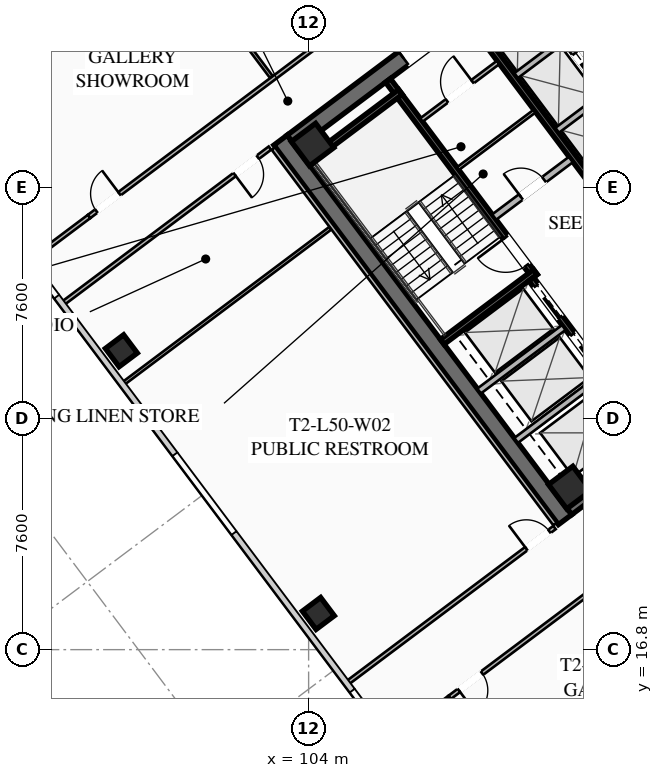
"""IFC4 building model, lengths in metres.
Left out: names, types, materials, properties, quantities, classifications, styles, units other than length and angle.
Written with IfcOpenShell. Run it as: python <this file> out.ifc"""

import sys

from ifc_helpers import new_model, si_unit, direction, frame, frame_2d, origin, origin_2d, place, context, subcontext, project, spatial, rectangle, hollow_rectangle, extrude, element, fill, save


model = new_model("IFC4")
c1 = context("Model", 3, precision=1e-05, world=origin(), true_north=direction((0.0, 1.0)))
c2 = subcontext(c1, "Body", "Model", "MODEL_VIEW")
j1 = project(units=[si_unit("LENGTHUNIT", "METRE"), si_unit("PLANEANGLEUNIT", "RADIAN")], contexts=[c1])
p1 = place(None, origin())
s1 = spatial("IfcSite", under=j1, at=p1, CompositionType="ELEMENT")
p2 = place(p1, origin())
s2 = spatial("IfcBuilding", under=s1, at=p2, CompositionType="ELEMENT")
p3 = place(p2, frame((0.0, 0.0, 185.4)))
s3 = spatial("IfcBuildingStorey", under=s2, at=p3, CompositionType="ELEMENT", Elevation=185.4)
p4 = place(p3, frame((112.436, 21.077, 0.0), z_axis=(0.0, 0.0, 1.0), x_axis=(-0.600005007985, 0.799996243986, 0.0)))
e1 = element("IfcWall", 1, at=p4, inside=s3, PredefinedType="SHEAR", context=c2, shape_type="SweptSolid", body=[
    extrude(rectangle(XDim=15.6, YDim=0.55, at=frame_2d((7.8, 0.0))), origin(), (0.0, 0.0, 1.0), 3.55),
])
p5 = place(p3, frame((124.539, 30.498, 0.0), z_axis=(0.0, 0.0, 1.0), x_axis=(-0.799998054672, -0.600002593761, 0.0)))
e2 = element("IfcWall", 2, at=p5, inside=s3, PredefinedType="SHEAR", context=c2, shape_type="SweptSolid", body=[
    extrude(rectangle(XDim=15.06, YDim=0.55, at=frame_2d((7.53, 0.0))), origin(), (0.0, 0.0, 1.0), 3.55),
])
p6 = place(p5, frame((9.23, 0.0, 0.0)))
e3 = element("IfcOpeningElement", 3, at=p6, cuts=e2, PredefinedType="OPENING", context=c2, shape_type="SweptSolid", body=[
    extrude(rectangle(XDim=1.25, YDim=2.25, at=frame_2d((0.625, 1.125))), frame((0.0, 0.285, 0.0), z_axis=(0.0, -1.0, 0.0), x_axis=(1.0, 0.0, 0.0)), (0.0, 0.0, 1.0), 0.57),
])
p7 = place(p5, frame((4.18, 0.0, 0.0)))
e4 = element("IfcOpeningElement", 4, at=p7, cuts=e2, PredefinedType="OPENING", context=c2, shape_type="SweptSolid", body=[
    extrude(rectangle(XDim=1.25, YDim=2.25, at=frame_2d((0.625, 1.125))), frame((0.0, 0.285, 0.0), z_axis=(0.0, -1.0, 0.0), x_axis=(1.0, 0.0, 0.0)), (0.0, 0.0, 1.0), 0.57),
])
p8 = place(p3, frame((103.461, 33.502, 0.0), z_axis=(0.0, 0.0, 1.0), x_axis=(0.799998054672, 0.600002593761, 0.0)))
e5 = element("IfcWall", 5, at=p8, inside=s3, PredefinedType="SHEAR", context=c2, shape_type="SweptSolid", body=[
    extrude(rectangle(XDim=15.06, YDim=0.55, at=frame_2d((7.53, 0.0))), origin(), (0.0, 0.0, 1.0), 3.55),
])
p9 = place(p8, frame((4.58, 0.0, 0.0)))
e6 = element("IfcOpeningElement", 6, at=p9, cuts=e5, PredefinedType="OPENING", context=c2, shape_type="SweptSolid", body=[
    extrude(rectangle(XDim=1.25, YDim=2.25, at=frame_2d((0.625, 1.125))), frame((0.0, 0.285, 0.0), z_axis=(0.0, -1.0, 0.0), x_axis=(1.0, 0.0, 0.0)), (0.0, 0.0, 1.0), 0.57),
])
p10 = place(p8, frame((9.63, 0.0, 0.0)))
e7 = element("IfcOpeningElement", 7, at=p10, cuts=e5, PredefinedType="OPENING", context=c2, shape_type="SweptSolid", body=[
    extrude(rectangle(XDim=1.25, YDim=2.25, at=frame_2d((0.625, 1.125))), frame((0.0, 0.285, 0.0), z_axis=(0.0, -1.0, 0.0), x_axis=(1.0, 0.0, 0.0)), (0.0, 0.0, 1.0), 0.57),
])
for number, where, z_axis, x_axis in (
    (8, (112.59, 22.13, 0.0), (0.0, 0.0, 1.0), (0.8, 0.6, 0.0)),
    (9, (104.13, 33.41, 0.0), (0.0, 0.0, 1.0), (0.8, 0.6, 0.0)),
):
    element("IfcColumn", number, at=place(p3, frame(where, z_axis=z_axis, x_axis=x_axis)), inside=s3, PredefinedType="COLUMN", context=c2, shape_type="SweptSolid", body=[
        extrude(hollow_rectangle(XDim=1.0, YDim=1.0, WallThickness=0.04, at=origin_2d()), origin(), (0.0, 0.0, 1.0), 3.37),
    ])
for number, where, z_axis, x_axis in (
    (10, (97.84, 26.63, 0.0), (0.0, 0.0, 1.0), (0.8, 0.6, 0.0)),
    (11, (104.32, 17.99, 0.0), (0.0, 0.0, 1.0), (0.8, 0.6, 0.0)),
):
    element("IfcColumn", number, at=place(p3, frame(where, z_axis=z_axis, x_axis=x_axis)), inside=s3, PredefinedType="COLUMN", context=c2, shape_type="SweptSolid", body=[
        extrude(hollow_rectangle(XDim=0.75, YDim=0.75, WallThickness=0.032, at=origin_2d()), origin(), (0.0, 0.0, 1.0), 3.37),
    ])
p11 = place(p3, frame((111.44, 29.08, 0.0), z_axis=(0.0, 0.0, 1.0), x_axis=(-0.59999029481, 0.8000072788, 0.0)))
e12 = element("IfcWall", 12, at=p11, inside=s3, PredefinedType="SHEAR", context=c2, shape_type="SweptSolid", body=[
    extrude(rectangle(XDim=8.05, YDim=0.2, at=frame_2d((4.025, 0.0))), origin(), (0.0, 0.0, 1.0), 3.37),
])
p12 = place(p11, frame((0.45, 0.0, 0.0)))
e13 = element("IfcOpeningElement", 13, at=p12, cuts=e12, PredefinedType="OPENING", context=c2, shape_type="SweptSolid", body=[
    extrude(rectangle(XDim=1.15, YDim=2.2, at=frame_2d((0.575, 1.1))), frame((0.0, 0.11, 0.0), z_axis=(0.0, -1.0, 0.0), x_axis=(1.0, 0.0, 0.0)), (0.0, 0.0, 1.0), 0.22),
])
for number, where, z_axis, x_axis in (
    (14, (108.396, 26.922, 0.0), (0.0, 0.0, 1.0), (0.8, 0.6, 0.0)),
    (15, (103.956, 32.842, 0.0), (0.0, 0.0, 1.0), (0.8, 0.6, 0.0)),
):
    element("IfcWall", number, at=place(p3, frame(where, z_axis=z_axis, x_axis=x_axis)), inside=s3, PredefinedType="SHEAR", context=c2, shape_type="SweptSolid", body=[
        extrude(rectangle(XDim=3.83, YDim=0.2, at=frame_2d((1.915, 0.0))), origin(), (0.0, 0.0, 1.0), 3.37),
    ])
p13 = place(p3, frame((117.998, 25.936, 0.0), z_axis=(0.0, 0.0, 1.0), x_axis=(-0.600002693989, 0.799997979501, 0.0)))
e16 = element("IfcWall", 16, at=p13, inside=s3, PredefinedType="SHEAR", context=c2, shape_type="SweptSolid", body=[
    extrude(rectangle(XDim=14.5, YDim=0.2, at=frame_2d((7.25, 0.0))), origin(), (0.0, 0.0, 1.0), 3.37),
])
p14 = place(p3, frame((110.104, 31.028, 0.0), z_axis=(0.0, 0.0, 1.0), x_axis=(0.800018601094, 0.59997519774, 0.0)))
e17 = element("IfcWall", 17, at=p14, inside=s3, PredefinedType="SOLIDWALL", context=c2, shape_type="SweptSolid", body=[
    extrude(rectangle(XDim=3.15, YDim=0.22, at=frame_2d((1.575, 0.0))), origin(), (0.0, 0.0, 1.0), 2.723),
])
p15 = place(p14, frame((1.1, 0.0, 0.0)))
e18 = element("IfcOpeningElement", 18, at=p15, cuts=e17, PredefinedType="OPENING", context=c2, shape_type="SweptSolid", body=[
    extrude(rectangle(XDim=0.95, YDim=2.05, at=frame_2d((0.475, 1.025))), frame((0.0, 0.12, 0.0), z_axis=(0.0, -1.0, 0.0), x_axis=(1.0, 0.0, 0.0)), (0.0, 0.0, 1.0), 0.24),
])
p16 = place(p3, frame((115.19, 23.83, 0.0), z_axis=(0.0, 0.0, 1.0), x_axis=(-0.599993943644, 0.800004542231, 0.0)))
e19 = element("IfcWall", 19, at=p16, inside=s3, PredefinedType="SHEAR", context=c2, shape_type="SweptSolid", body=[
    extrude(rectangle(XDim=6.45, YDim=0.2, at=frame_2d((3.225, 0.0))), origin(), (0.0, 0.0, 1.0), 3.37),
])
p17 = place(p16, frame((4.875, 0.0, 0.0)))
e20 = element("IfcOpeningElement", 20, at=p17, cuts=e19, PredefinedType="OPENING", context=c2, shape_type="SweptSolid", body=[
    extrude(rectangle(XDim=1.3, YDim=2.25, at=frame_2d((0.65, 1.125))), frame((0.0, 0.11, 0.0), z_axis=(0.0, -1.0, 0.0), x_axis=(1.0, 0.0, 0.0)), (0.0, 0.0, 1.0), 0.22),
])
p18 = place(p16, frame((2.875, 0.0, 0.0)))
e21 = element("IfcOpeningElement", 21, at=p18, cuts=e19, PredefinedType="OPENING", context=c2, shape_type="SweptSolid", body=[
    extrude(rectangle(XDim=1.3, YDim=2.25, at=frame_2d((0.65, 1.125))), frame((0.0, 0.11, 0.0), z_axis=(0.0, -1.0, 0.0), x_axis=(1.0, 0.0, 0.0)), (0.0, 0.0, 1.0), 0.22),
])
p19 = place(p16, frame((0.675, 0.0, 0.0)))
e22 = element("IfcOpeningElement", 22, at=p19, cuts=e19, PredefinedType="OPENING", context=c2, shape_type="SweptSolid", body=[
    extrude(rectangle(XDim=1.3, YDim=2.25, at=frame_2d((0.65, 1.125))), frame((0.0, 0.11, 0.0), z_axis=(0.0, -1.0, 0.0), x_axis=(1.0, 0.0, 0.0)), (0.0, 0.0, 1.0), 0.22),
])
for number, where, z_axis, x_axis in (
    (23, (110.826, 23.682, 0.0), (0.0, 0.0, 1.0), (0.8, 0.6, 0.0)),
    (24, (109.608, 25.306, 0.0), (0.0, 0.0, 1.0), (0.8, 0.6, 0.0)),
):
    element("IfcWall", number, at=place(p3, frame(where, z_axis=z_axis, x_axis=x_axis)), inside=s3, PredefinedType="SOLIDWALL", context=c2, shape_type="SweptSolid", body=[
        extrude(rectangle(XDim=3.48, YDim=0.2, at=frame_2d((1.74, 0.0))), origin(), (0.0, 0.0, 1.0), 3.37),
    ])
p20 = place(p3, frame((112.81, 40.17, 0.0), z_axis=(0.0, 0.0, 1.0), x_axis=(0.599993943644, -0.800004542231, 0.0)))
e25 = element("IfcWall", 25, at=p20, inside=s3, PredefinedType="SHEAR", context=c2, shape_type="SweptSolid", body=[
    extrude(rectangle(XDim=6.45, YDim=0.2, at=frame_2d((3.225, 0.0))), origin(), (0.0, 0.0, 1.0), 3.37),
])
p21 = place(p3, frame((107.71, 34.22, 0.0), z_axis=(0.0, 0.0, 1.0), x_axis=(0.799981399002, 0.60002480053, 0.0)))
e26 = element("IfcWall", 26, at=p21, inside=s3, PredefinedType="PARTITIONING", context=c2, shape_type="SweptSolid", body=[
    extrude(rectangle(XDim=3.15, YDim=0.135, at=frame_2d((1.575, 0.0))), origin(), (0.0, 0.0, 1.0), 2.723),
])
p22 = place(p21, frame((1.05, 0.0, 0.0)))
e27 = element("IfcOpeningElement", 27, at=p22, cuts=e26, PredefinedType="OPENING", context=c2, shape_type="SweptSolid", body=[
    extrude(rectangle(XDim=1.05, YDim=2.2, at=frame_2d((0.525, 1.1))), frame((0.0, 0.077, 0.0), z_axis=(0.0, -1.0, 0.0), x_axis=(1.0, 0.0, 0.0)), (0.0, 0.0, 1.0), 0.155),
])
p23 = place(p3, frame((108.91, 32.62, 0.0), z_axis=(0.0, 0.0, 1.0), x_axis=(0.800018601094, 0.59997519774, 0.0)))
e28 = element("IfcWall", 28, at=p23, inside=s3, PredefinedType="PARTITIONING", context=c2, shape_type="SweptSolid", body=[
    extrude(rectangle(XDim=3.15, YDim=0.11, at=frame_2d((1.575, 0.0))), origin(), (0.0, 0.0, 1.0), 2.723),
])
p24 = place(p3, frame((115.11, 33.27, 0.0), z_axis=(0.0, 0.0, 1.0), x_axis=(-0.600011322243, 0.799991508192, 0.0)))
e29 = element("IfcWall", 29, at=p24, inside=s3, PredefinedType="SOLIDWALL", context=c2, shape_type="SweptSolid", body=[
    extrude(rectangle(XDim=6.9, YDim=0.2, at=frame_2d((3.45, 0.0))), origin(), (0.0, 0.0, 1.0), 3.37),
])
p25 = place(p24, frame((0.575, 0.0, 0.0)))
e30 = element("IfcOpeningElement", 30, at=p25, cuts=e29, PredefinedType="OPENING", context=c2, shape_type="SweptSolid", body=[
    extrude(rectangle(XDim=1.1, YDim=2.2, at=frame_2d((0.55, 1.1))), frame((0.0, 0.11, 0.0), z_axis=(0.0, -1.0, 0.0), x_axis=(1.0, 0.0, 0.0)), (0.0, 0.0, 1.0), 0.22),
])
p26 = place(p24, frame((2.825, 0.0, 0.0)))
e31 = element("IfcOpeningElement", 31, at=p26, cuts=e29, PredefinedType="OPENING", context=c2, shape_type="SweptSolid", body=[
    extrude(rectangle(XDim=1.1, YDim=2.2, at=frame_2d((0.55, 1.1))), frame((0.0, 0.11, 0.0), z_axis=(0.0, -1.0, 0.0), x_axis=(1.0, 0.0, 0.0)), (0.0, 0.0, 1.0), 0.22),
])
p27 = place(p24, frame((5.075, 0.0, 0.0)))
e32 = element("IfcOpeningElement", 32, at=p27, cuts=e29, PredefinedType="OPENING", context=c2, shape_type="SweptSolid", body=[
    extrude(rectangle(XDim=1.1, YDim=2.2, at=frame_2d((0.55, 1.1))), frame((0.0, 0.11, 0.0), z_axis=(0.0, -1.0, 0.0), x_axis=(1.0, 0.0, 0.0)), (0.0, 0.0, 1.0), 0.22),
])
p28 = place(p3, frame((112.176, 33.882, 0.0), z_axis=(0.0, 0.0, 1.0), x_axis=(0.8, 0.6, 0.0)))
e33 = element("IfcWall", 33, at=p28, inside=s3, PredefinedType="SOLIDWALL", context=c2, shape_type="SweptSolid", body=[
    extrude(rectangle(XDim=1.88, YDim=0.2, at=frame_2d((0.94, 0.0))), origin(), (0.0, 0.0, 1.0), 3.37),
])
p29 = place(p3, frame((110.826, 35.682, 0.0), z_axis=(0.0, 0.0, 1.0), x_axis=(0.799984418148, 0.600020775241, 0.0)))
e34 = element("IfcWall", 34, at=p29, inside=s3, PredefinedType="SOLIDWALL", context=c2, shape_type="SweptSolid", body=[
    extrude(rectangle(XDim=1.88, YDim=0.2, at=frame_2d((0.94, 0.0))), origin(), (0.0, 0.0, 1.0), 3.37),
])
p30 = place(p3, frame((96.778, 31.046, 0.0), z_axis=(0.0, 0.0, 1.0), x_axis=(0.799995916807, 0.600005444218, 0.0)))
e35 = element("IfcWall", 35, at=p30, inside=s3, PredefinedType="PARTITIONING", context=c2, shape_type="SweptSolid", body=[
    extrude(rectangle(XDim=28.7, YDim=0.135, at=frame_2d((14.35, 0.0))), origin(), (0.0, 0.0, 1.0), 2.723),
])
p31 = place(p30, frame((0.3, 0.0, 0.0)))
e36 = element("IfcOpeningElement", 36, at=p31, cuts=e35, PredefinedType="OPENING", context=c2, shape_type="SweptSolid", body=[
    extrude(rectangle(XDim=0.95, YDim=2.05, at=frame_2d((0.475, 1.025))), frame((0.0, 0.077, 0.0), z_axis=(0.0, -1.0, 0.0), x_axis=(1.0, 0.0, 0.0)), (0.0, 0.0, 1.0), 0.155),
])
p32 = place(p30, frame((13.82, 0.0, 0.0)))
e37 = element("IfcOpeningElement", 37, at=p32, cuts=e35, PredefinedType="OPENING", context=c2, shape_type="SweptSolid", body=[
    extrude(rectangle(XDim=0.95, YDim=2.05, at=frame_2d((0.475, 1.025))), frame((0.0, 0.077, 0.0), z_axis=(0.0, -1.0, 0.0), x_axis=(1.0, 0.0, 0.0)), (0.0, 0.0, 1.0), 0.155),
])
p33 = place(p30, frame((17.821, 0.0, 0.0)))
e38 = element("IfcOpeningElement", 38, at=p33, cuts=e35, PredefinedType="OPENING", context=c2, shape_type="SweptSolid", body=[
    extrude(rectangle(XDim=0.95, YDim=2.05, at=frame_2d((0.475, 1.025))), frame((0.0, 0.077, 0.0), z_axis=(0.0, -1.0, 0.0), x_axis=(1.0, 0.0, 0.0)), (0.0, 0.0, 1.0), 0.155),
])
p34 = place(p30, frame((27.45, 0.0, 0.0)))
e39 = element("IfcOpeningElement", 39, at=p34, cuts=e35, PredefinedType="OPENING", context=c2, shape_type="SweptSolid", body=[
    extrude(rectangle(XDim=0.95, YDim=2.05, at=frame_2d((0.475, 1.025))), frame((0.0, 0.077, 0.0), z_axis=(0.0, -1.0, 0.0), x_axis=(1.0, 0.0, 0.0)), (0.0, 0.0, 1.0), 0.155),
])
p35 = place(p3, frame((94.834, 29.588, 0.0), z_axis=(0.0, 0.0, 1.0), x_axis=(0.800012055778, 0.599983925293, 0.0)))
e40 = element("IfcWall", 40, at=p35, inside=s3, PredefinedType="PARTITIONING", context=c2, shape_type="SweptSolid", body=[
    extrude(rectangle(XDim=2.43, YDim=0.135, at=frame_2d((1.215, 0.0))), origin(), (0.0, 0.0, 1.0), 2.723),
])
p36 = place(p3, frame((102.77, 35.64, 0.0), z_axis=(0.0, 0.0, 1.0), x_axis=(-0.6, 0.8, 0.0)))
e41 = element("IfcWall", 41, at=p36, inside=s3, PredefinedType="PARTITIONING", context=c2, shape_type="SweptSolid", body=[
    extrude(rectangle(XDim=7.13, YDim=0.11, at=frame_2d((3.565, 0.0))), origin(), (0.0, 0.0, 1.0), 2.723),
])
p37 = place(p3, frame((131.6, 32.45, 0.0), z_axis=(0.0, 0.0, 1.0), x_axis=(-0.800003062365, -0.599995916825, 0.0)))
e42 = element("IfcWall", 42, at=p37, inside=s3, PredefinedType="PARTITIONING", context=c2, shape_type="SweptSolid", body=[
    extrude(rectangle(XDim=28.7, YDim=0.135, at=frame_2d((14.35, 0.0))), origin(), (0.0, 0.0, 1.0), 2.723),
])
p38 = place(p37, frame((27.37, 0.0, 0.0)))
e43 = element("IfcOpeningElement", 43, at=p38, cuts=e42, PredefinedType="OPENING", context=c2, shape_type="SweptSolid", body=[
    extrude(rectangle(XDim=0.95, YDim=2.05, at=frame_2d((0.475, 1.025))), frame((0.0, 0.077, 0.0), z_axis=(0.0, -1.0, 0.0), x_axis=(1.0, 0.0, 0.0)), (0.0, 0.0, 1.0), 0.155),
])
p39 = place(p37, frame((13.59, 0.0, 0.0)))
e44 = element("IfcOpeningElement", 44, at=p39, cuts=e42, PredefinedType="OPENING", context=c2, shape_type="SweptSolid", body=[
    extrude(rectangle(XDim=0.95, YDim=2.05, at=frame_2d((0.475, 1.025))), frame((0.0, 0.077, 0.0), z_axis=(0.0, -1.0, 0.0), x_axis=(1.0, 0.0, 0.0)), (0.0, 0.0, 1.0), 0.155),
])
p40 = place(p37, frame((9.796, 0.0, 0.0)))
e45 = element("IfcOpeningElement", 45, at=p40, cuts=e42, PredefinedType="OPENING", context=c2, shape_type="SweptSolid", body=[
    extrude(rectangle(XDim=0.95, YDim=2.05, at=frame_2d((0.475, 1.025))), frame((0.0, 0.077, 0.0), z_axis=(0.0, -1.0, 0.0), x_axis=(1.0, 0.0, 0.0)), (0.0, 0.0, 1.0), 0.155),
])
p41 = place(p37, frame((0.38, 0.0, 0.0)))
e46 = element("IfcOpeningElement", 46, at=p41, cuts=e42, PredefinedType="OPENING", context=c2, shape_type="SweptSolid", body=[
    extrude(rectangle(XDim=0.95, YDim=2.05, at=frame_2d((0.475, 1.025))), frame((0.0, 0.077, 0.0), z_axis=(0.0, -1.0, 0.0), x_axis=(1.0, 0.0, 0.0)), (0.0, 0.0, 1.0), 0.155),
])
p42 = place(p3, frame((106.696, 13.772, 0.0), z_axis=(0.0, 0.0, 1.0), x_axis=(0.799975885537, 0.600032151272, 0.0)))
e47 = element("IfcWall", 47, at=p42, inside=s3, PredefinedType="PARTITIONING", context=c2, shape_type="SweptSolid", body=[
    extrude(rectangle(XDim=2.43, YDim=0.135, at=frame_2d((1.215, 0.0))), origin(), (0.0, 0.0, 1.0), 2.723),
])
p43 = place(p3, frame((112.104, 20.928, 0.0), z_axis=(0.0, 0.0, 1.0), x_axis=(-0.599994940075, 0.800003794918, 0.0)))
e48 = element("IfcWall", 48, at=p43, inside=s3, PredefinedType="PARTITIONING", context=c2, shape_type="SweptSolid", body=[
    extrude(rectangle(XDim=15.44, YDim=0.135, at=frame_2d((7.72, 0.0))), origin(), (0.0, 0.0, 1.0), 2.723),
])
p44 = place(p3, frame((102.728, 33.296, 0.0), z_axis=(0.0, 0.0, 1.0), x_axis=(-0.800013722153, -0.59998170336, 0.0)))
e49 = element("IfcWall", 49, at=p44, inside=s3, PredefinedType="PARTITIONING", context=c2, shape_type="SweptSolid", body=[
    extrude(rectangle(XDim=8.54, YDim=0.135, at=frame_2d((4.27, 0.0))), origin(), (0.0, 0.0, 1.0), 2.723),
])
p45 = place(p44, frame((0.5, 0.0, 0.0)))
e50 = element("IfcOpeningElement", 50, at=p45, cuts=e49, PredefinedType="OPENING", context=c2, shape_type="SweptSolid", body=[
    extrude(rectangle(XDim=0.95, YDim=2.05, at=frame_2d((0.475, 1.025))), frame((0.0, 0.077, 0.0), z_axis=(0.0, -1.0, 0.0), x_axis=(1.0, 0.0, 0.0)), (0.0, 0.0, 1.0), 0.155),
])
p46 = place(p3, frame((105.256, 15.692, 0.0), z_axis=(0.0, 0.0, 1.0), x_axis=(0.799989708052, 0.600013722352, 0.0)))
e51 = element("IfcWall", 51, at=p46, inside=s3, PredefinedType="PARTITIONING", context=c2, shape_type="SweptSolid", body=[
    extrude(rectangle(XDim=8.54, YDim=0.135, at=frame_2d((4.27, 0.0))), origin(), (0.0, 0.0, 1.0), 2.723),
])
p47 = place(p46, frame((7.38, 0.0, 0.0)))
e52 = element("IfcOpeningElement", 52, at=p47, cuts=e51, PredefinedType="OPENING", context=c2, shape_type="SweptSolid", body=[
    extrude(rectangle(XDim=0.95, YDim=2.05, at=frame_2d((0.475, 1.025))), frame((0.0, 0.077, 0.0), z_axis=(0.0, -1.0, 0.0), x_axis=(1.0, 0.0, 0.0)), (0.0, 0.0, 1.0), 0.155),
])
p48 = place(p3, frame((97.876, 25.532, 0.0), z_axis=(0.0, 0.0, 1.0), x_axis=(0.8, 0.6, 0.0)))
e53 = element("IfcWall", 53, at=p48, inside=s3, PredefinedType="PARTITIONING", context=c2, shape_type="SweptSolid", body=[
    extrude(rectangle(XDim=8.54, YDim=0.11, at=frame_2d((4.27, 0.0))), origin(), (0.0, 0.0, 1.0), 2.723),
])
p49 = place(p9, origin())
e54 = element("IfcDoor", 54, at=p49, inside=s3, OperationType="SINGLE_SWING_LEFT", PredefinedType="DOOR", context=c2, shape_type="SweptSolid", body=[
    extrude(rectangle(XDim=1.25, YDim=2.25, at=frame_2d((0.625, 1.125))), frame((0.0, 0.025, 0.0), z_axis=(0.0, -1.0, 0.0), x_axis=(1.0, 0.0, 0.0)), (0.0, 0.0, 1.0), 0.05),
])
fill(e6, e54)
p50 = place(p12, origin())
e55 = element("IfcDoor", 55, at=p50, inside=s3, OperationType="SINGLE_SWING_RIGHT", PredefinedType="DOOR", context=c2, shape_type="SweptSolid", body=[
    extrude(rectangle(XDim=1.15, YDim=2.2, at=frame_2d((0.575, 1.1))), frame((0.0, 0.025, 0.0), z_axis=(0.0, -1.0, 0.0), x_axis=(1.0, 0.0, 0.0)), (0.0, 0.0, 1.0), 0.05),
])
fill(e13, e55)
p51 = place(p22, origin())
e56 = element("IfcDoor", 56, at=p51, inside=s3, OperationType="SINGLE_SWING_RIGHT", PredefinedType="DOOR", context=c2, shape_type="SweptSolid", body=[
    extrude(rectangle(XDim=1.05, YDim=2.2, at=frame_2d((0.525, 1.1))), frame((0.0, 0.025, 0.0), z_axis=(0.0, -1.0, 0.0), x_axis=(1.0, 0.0, 0.0)), (0.0, 0.0, 1.0), 0.05),
])
fill(e27, e56)
p52 = place(p15, origin())
e57 = element("IfcDoor", 57, at=p52, inside=s3, OperationType="SINGLE_SWING_LEFT", PredefinedType="DOOR", context=c2, shape_type="SweptSolid", body=[
    extrude(rectangle(XDim=0.95, YDim=2.05, at=frame_2d((0.475, 1.025))), frame((0.0, 0.025, 0.0), z_axis=(0.0, -1.0, 0.0), x_axis=(1.0, 0.0, 0.0)), (0.0, 0.0, 1.0), 0.05),
])
fill(e18, e57)
p53 = place(p31, origin())
e58 = element("IfcDoor", 58, at=p53, inside=s3, OperationType="SINGLE_SWING_RIGHT", PredefinedType="DOOR", context=c2, shape_type="SweptSolid", body=[
    extrude(rectangle(XDim=0.95, YDim=2.05, at=frame_2d((0.475, 1.025))), frame((0.0, 0.025, 0.0), z_axis=(0.0, -1.0, 0.0), x_axis=(1.0, 0.0, 0.0)), (0.0, 0.0, 1.0), 0.05),
])
fill(e36, e58)
p54 = place(p38, origin())
e59 = element("IfcDoor", 59, at=p54, inside=s3, OperationType="SINGLE_SWING_RIGHT", PredefinedType="DOOR", context=c2, shape_type="SweptSolid", body=[
    extrude(rectangle(XDim=0.95, YDim=2.05, at=frame_2d((0.475, 1.025))), frame((0.0, 0.025, 0.0), z_axis=(0.0, -1.0, 0.0), x_axis=(1.0, 0.0, 0.0)), (0.0, 0.0, 1.0), 0.05),
])
fill(e43, e59)
p55 = place(p45, origin())
e60 = element("IfcDoor", 60, at=p55, inside=s3, OperationType="SINGLE_SWING_RIGHT", PredefinedType="DOOR", context=c2, shape_type="SweptSolid", body=[
    extrude(rectangle(XDim=0.95, YDim=2.05, at=frame_2d((0.475, 1.025))), frame((0.0, 0.025, 0.0), z_axis=(0.0, -1.0, 0.0), x_axis=(1.0, 0.0, 0.0)), (0.0, 0.0, 1.0), 0.05),
])
fill(e50, e60)
p56 = place(p47, origin())
e61 = element("IfcDoor", 61, at=p56, inside=s3, OperationType="SINGLE_SWING_LEFT", PredefinedType="DOOR", context=c2, shape_type="SweptSolid", body=[
    extrude(rectangle(XDim=0.95, YDim=2.05, at=frame_2d((0.475, 1.025))), frame((0.0, 0.025, 0.0), z_axis=(0.0, -1.0, 0.0), x_axis=(1.0, 0.0, 0.0)), (0.0, 0.0, 1.0), 0.05),
])
fill(e52, e61)
p57 = place(p17, origin())
e62 = element("IfcDoor", 62, at=p57, inside=s3, OperationType="SLIDING_TO_LEFT", PredefinedType="DOOR", context=c2, shape_type="SweptSolid", body=[
    extrude(rectangle(XDim=1.3, YDim=2.25, at=frame_2d((0.65, 1.125))), frame((0.0, 0.025, 0.0), z_axis=(0.0, -1.0, 0.0), x_axis=(1.0, 0.0, 0.0)), (0.0, 0.0, 1.0), 0.05),
])
fill(e20, e62)
p58 = place(p18, origin())
e63 = element("IfcDoor", 63, at=p58, inside=s3, OperationType="SLIDING_TO_LEFT", PredefinedType="DOOR", context=c2, shape_type="SweptSolid", body=[
    extrude(rectangle(XDim=1.3, YDim=2.25, at=frame_2d((0.65, 1.125))), frame((0.0, 0.025, 0.0), z_axis=(0.0, -1.0, 0.0), x_axis=(1.0, 0.0, 0.0)), (0.0, 0.0, 1.0), 0.05),
])
fill(e21, e63)
p59 = place(p26, origin())
e64 = element("IfcDoor", 64, at=p59, inside=s3, OperationType="SLIDING_TO_LEFT", PredefinedType="DOOR", context=c2, shape_type="SweptSolid", body=[
    extrude(rectangle(XDim=1.1, YDim=2.2, at=frame_2d((0.55, 1.1))), frame((0.0, 0.025, 0.0), z_axis=(0.0, -1.0, 0.0), x_axis=(1.0, 0.0, 0.0)), (0.0, 0.0, 1.0), 0.05),
])
fill(e31, e64)
save(model, sys.argv[1])
